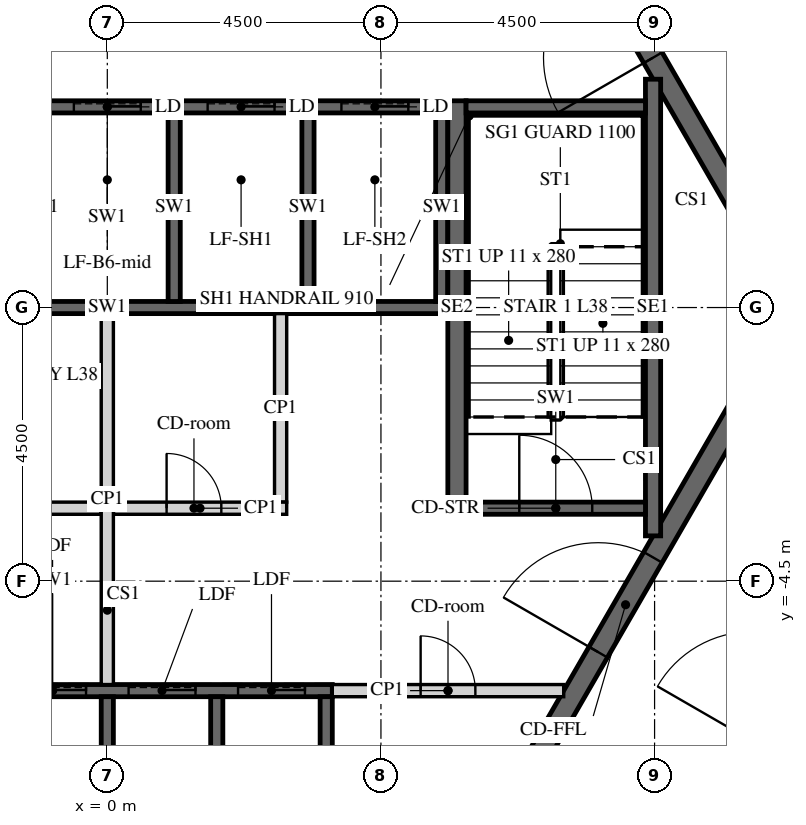
"""IFC4 building model, lengths in metres.
Left out: names, types, materials, properties, quantities, classifications, styles, units other than length and angle.
Written with IfcOpenShell. Run it as: python <this file> out.ifc"""

import sys

from ifc_helpers import new_model, si_unit, direction, frame, frame_2d, origin, place, context, subcontext, project, spatial, polyline, rectangle, outline, extrude, element, fill, save


model = new_model("IFC4")
c1 = context("Model", 3, precision=1e-05, world=origin(), true_north=direction((0.0, 1.0)))
c2 = subcontext(c1, "Body", "Model", "MODEL_VIEW")
j1 = project(units=[si_unit("LENGTHUNIT", "METRE"), si_unit("PLANEANGLEUNIT", "RADIAN")], contexts=[c1])
p1 = place(None, origin())
s1 = spatial("IfcSite", under=j1, at=p1, CompositionType="ELEMENT")
p2 = place(p1, origin())
s2 = spatial("IfcBuilding", under=s1, at=p2, CompositionType="ELEMENT")
p3 = place(p2, frame((0.0, 0.0, 164.4)))
s3 = spatial("IfcBuildingStorey", under=s2, at=p3, CompositionType="ELEMENT", Elevation=164.4)
p4 = place(p3, frame((7.361, -12.75, -0.15), z_axis=(0.0, 0.0, 1.0), x_axis=(0.50000571537, 0.866022103989, 0.0)))
e1 = element("IfcWall", 1, at=p4, inside=s3, PredefinedType="SHEAR", context=c2, shape_type="SweptSolid", body=[
    extrude(outline(polyline([(-0.144, -0.25), (14.867, -0.25), (14.578, 0.25), (0.144, 0.25), (-0.144, -0.25)])), origin(), (0.0, 0.0, 1.0), 3.9),
])
p5 = place(p4, frame((6.49, 0.0, 0.15)))
e2 = element("IfcOpeningElement", 2, at=p5, cuts=e1, PredefinedType="OPENING", context=c2, shape_type="SweptSolid", body=[
    extrude(rectangle(XDim=1.8, YDim=2.4, at=frame_2d((0.9, 1.2))), frame((0.0, 0.26, 0.0), z_axis=(0.0, -1.0, 0.0), x_axis=(1.0, 0.0, 0.0)), (0.0, 0.0, 1.0), 0.52),
])
p6 = place(p3, frame((14.722, 0.0, -0.15), z_axis=(0.0, 0.0, 1.0), x_axis=(-0.50000571537, 0.866022103989, 0.0)))
e3 = element("IfcWall", 3, at=p6, inside=s3, PredefinedType="SHEAR", context=c2, shape_type="SweptSolid", body=[
    extrude(outline(polyline([(-0.144, -0.25), (14.867, -0.25), (14.578, 0.25), (0.144, 0.25), (-0.144, -0.25)])), origin(), (0.0, 0.0, 1.0), 3.9),
])
p7 = place(p6, frame((6.432, 0.0, 0.15)))
e4 = element("IfcOpeningElement", 4, at=p7, cuts=e3, PredefinedType="OPENING", context=c2, shape_type="SweptSolid", body=[
    extrude(rectangle(XDim=1.8, YDim=2.4, at=frame_2d((0.9, 1.2))), frame((0.0, 0.26, 0.0), z_axis=(0.0, -1.0, 0.0), x_axis=(1.0, 0.0, 0.0)), (0.0, 0.0, 1.0), 0.52),
])
p8 = place(p3, frame((5.673, -9.825, -0.15), z_axis=(0.0, 0.0, 1.0), x_axis=(0.499995046907, 0.866028263435, 0.0)))
e5 = element("IfcWall", 5, at=p8, inside=s3, PredefinedType="SHEAR", context=c2, shape_type="SweptSolid", body=[
    extrude(outline(polyline([(-0.101, -0.175), (11.446, -0.175), (11.244, 0.175), (0.101, 0.175), (-0.101, -0.175)])), origin(), (0.0, 0.0, 1.0), 3.9),
])
p9 = place(p8, frame((4.801, 0.0, 0.15)))
e6 = element("IfcOpeningElement", 6, at=p9, cuts=e5, PredefinedType="OPENING", context=c2, shape_type="SweptSolid", body=[
    extrude(rectangle(XDim=1.8, YDim=2.4, at=frame_2d((0.9, 1.2))), frame((0.0, 0.185, 0.0), z_axis=(0.0, -1.0, 0.0), x_axis=(1.0, 0.0, 0.0)), (0.0, 0.0, 1.0), 0.37),
])
p10 = place(p3, frame((11.345, 0.0, -0.15), z_axis=(0.0, 0.0, 1.0), x_axis=(-0.499995046907, 0.866028263435, 0.0)))
e7 = element("IfcWall", 7, at=p10, inside=s3, PredefinedType="SHEAR", context=c2, shape_type="SweptSolid", body=[
    extrude(outline(polyline([(-0.101, -0.175), (11.446, -0.175), (11.244, 0.175), (0.101, 0.175), (-0.101, -0.175)])), origin(), (0.0, 0.0, 1.0), 3.9),
])
p11 = place(p10, frame((4.744, 0.0, 0.15)))
e8 = element("IfcOpeningElement", 8, at=p11, cuts=e7, PredefinedType="OPENING", context=c2, shape_type="SweptSolid", body=[
    extrude(rectangle(XDim=1.8, YDim=2.4, at=frame_2d((0.9, 1.2))), frame((0.0, 0.185, 0.0), z_axis=(0.0, -1.0, 0.0), x_axis=(1.0, 0.0, 0.0)), (0.0, 0.0, 1.0), 0.37),
])
p12 = place(p3, frame((-5.6, 3.3, -0.25), z_axis=(0.0, 0.0, 1.0), x_axis=(1.0, 0.0, 0.0)))
e9 = element("IfcWall", 9, at=p12, inside=s3, PredefinedType="SHEAR", context=c2, shape_type="SweptSolid", body=[
    extrude(rectangle(XDim=11.2, YDim=0.2, at=frame_2d((5.6, 0.0))), origin(), (0.0, 0.0, 1.0), 3.9),
])
p13 = place(p12, frame((0.65, 0.0, 0.25)))
e10 = element("IfcOpeningElement", 10, at=p13, cuts=e9, PredefinedType="OPENING", context=c2, shape_type="SweptSolid", body=[
    extrude(rectangle(XDim=1.1, YDim=2.1, at=frame_2d((0.55, 1.05))), frame((0.0, 0.11, 0.0), z_axis=(0.0, -1.0, 0.0), x_axis=(1.0, 0.0, 0.0)), (0.0, 0.0, 1.0), 0.22),
])
p14 = place(p12, frame((2.85, 0.0, 0.25)))
e11 = element("IfcOpeningElement", 11, at=p14, cuts=e9, PredefinedType="OPENING", context=c2, shape_type="SweptSolid", body=[
    extrude(rectangle(XDim=1.1, YDim=2.1, at=frame_2d((0.55, 1.05))), frame((0.0, 0.11, 0.0), z_axis=(0.0, -1.0, 0.0), x_axis=(1.0, 0.0, 0.0)), (0.0, 0.0, 1.0), 0.22),
])
p15 = place(p12, frame((5.05, 0.0, 0.25)))
e12 = element("IfcOpeningElement", 12, at=p15, cuts=e9, PredefinedType="OPENING", context=c2, shape_type="SweptSolid", body=[
    extrude(rectangle(XDim=1.1, YDim=2.1, at=frame_2d((0.55, 1.05))), frame((0.0, 0.11, 0.0), z_axis=(0.0, -1.0, 0.0), x_axis=(1.0, 0.0, 0.0)), (0.0, 0.0, 1.0), 0.22),
])
p16 = place(p12, frame((7.25, 0.0, 0.25)))
e13 = element("IfcOpeningElement", 13, at=p16, cuts=e9, PredefinedType="OPENING", context=c2, shape_type="SweptSolid", body=[
    extrude(rectangle(XDim=1.1, YDim=2.1, at=frame_2d((0.55, 1.05))), frame((0.0, 0.11, 0.0), z_axis=(0.0, -1.0, 0.0), x_axis=(1.0, 0.0, 0.0)), (0.0, 0.0, 1.0), 0.22),
])
p17 = place(p12, frame((9.45, 0.0, 0.25)))
e14 = element("IfcOpeningElement", 14, at=p17, cuts=e9, PredefinedType="OPENING", context=c2, shape_type="SweptSolid", body=[
    extrude(rectangle(XDim=1.1, YDim=2.1, at=frame_2d((0.55, 1.05))), frame((0.0, 0.11, 0.0), z_axis=(0.0, -1.0, 0.0), x_axis=(1.0, 0.0, 0.0)), (0.0, 0.0, 1.0), 0.22),
])
p18 = place(p3, frame((-5.6, 0.0, -0.25), z_axis=(0.0, 0.0, 1.0), x_axis=(1.0, 0.0, 0.0)))
e15 = element("IfcWall", 15, at=p18, inside=s3, PredefinedType="SHEAR", context=c2, shape_type="SweptSolid", body=[
    extrude(rectangle(XDim=11.2, YDim=0.2, at=frame_2d((5.6, 0.0))), origin(), (0.0, 0.0, 1.0), 3.9),
])
for number, where, z_axis, x_axis in (
    (16, (1.1, 0.1, -0.25), (0.0, 0.0, 1.0), (0.0, 1.0, 0.0)),
    (17, (3.3, 0.1, -0.25), (0.0, 0.0, 1.0), (0.0, 1.0, 0.0)),
    (18, (5.5, 0.1, -0.25), (0.0, 0.0, 1.0), (0.0, 1.0, 0.0)),
):
    element("IfcWall", number, at=place(p3, frame(where, z_axis=z_axis, x_axis=x_axis)), inside=s3, PredefinedType="SHEAR", context=c2, shape_type="SweptSolid", body=[
        extrude(rectangle(XDim=3.1, YDim=0.2, at=frame_2d((1.55, 0.0))), origin(), (0.0, 0.0, 1.0), 3.9),
    ])
p19 = place(p3, frame((-5.5, -6.3, -0.25), z_axis=(0.0, 0.0, 1.0), x_axis=(1.0, 0.0, 0.0)))
e19 = element("IfcWall", 19, at=p19, inside=s3, PredefinedType="SHEAR", context=c2, shape_type="SweptSolid", body=[
    extrude(rectangle(XDim=9.2, YDim=0.2, at=frame_2d((4.6, 0.0))), origin(), (0.0, 0.0, 1.0), 3.9),
])
p20 = place(p19, frame((0.45, 0.0, 0.25)))
e20 = element("IfcOpeningElement", 20, at=p20, cuts=e19, PredefinedType="OPENING", context=c2, shape_type="SweptSolid", body=[
    extrude(rectangle(XDim=1.1, YDim=2.1, at=frame_2d((0.55, 1.05))), frame((0.0, 0.11, 0.0), z_axis=(0.0, -1.0, 0.0), x_axis=(1.0, 0.0, 0.0)), (0.0, 0.0, 1.0), 0.22),
])
p21 = place(p19, frame((2.25, 0.0, 0.25)))
e21 = element("IfcOpeningElement", 21, at=p21, cuts=e19, PredefinedType="OPENING", context=c2, shape_type="SweptSolid", body=[
    extrude(rectangle(XDim=1.1, YDim=2.1, at=frame_2d((0.55, 1.05))), frame((0.0, 0.11, 0.0), z_axis=(0.0, -1.0, 0.0), x_axis=(1.0, 0.0, 0.0)), (0.0, 0.0, 1.0), 0.22),
])
p22 = place(p19, frame((4.05, 0.0, 0.25)))
e22 = element("IfcOpeningElement", 22, at=p22, cuts=e19, PredefinedType="OPENING", context=c2, shape_type="SweptSolid", body=[
    extrude(rectangle(XDim=1.1, YDim=2.1, at=frame_2d((0.55, 1.05))), frame((0.0, 0.11, 0.0), z_axis=(0.0, -1.0, 0.0), x_axis=(1.0, 0.0, 0.0)), (0.0, 0.0, 1.0), 0.22),
])
p23 = place(p19, frame((5.85, 0.0, 0.25)))
e23 = element("IfcOpeningElement", 23, at=p23, cuts=e19, PredefinedType="OPENING", context=c2, shape_type="SweptSolid", body=[
    extrude(rectangle(XDim=1.1, YDim=2.1, at=frame_2d((0.55, 1.05))), frame((0.0, 0.11, 0.0), z_axis=(0.0, -1.0, 0.0), x_axis=(1.0, 0.0, 0.0)), (0.0, 0.0, 1.0), 0.22),
])
p24 = place(p19, frame((7.65, 0.0, 0.25)))
e24 = element("IfcOpeningElement", 24, at=p24, cuts=e19, PredefinedType="OPENING", context=c2, shape_type="SweptSolid", body=[
    extrude(rectangle(XDim=1.1, YDim=2.1, at=frame_2d((0.55, 1.05))), frame((0.0, 0.11, 0.0), z_axis=(0.0, -1.0, 0.0), x_axis=(1.0, 0.0, 0.0)), (0.0, 0.0, 1.0), 0.22),
])
for number, where, z_axis, x_axis in (
    (25, (0.0, -9.3, -0.25), (0.0, 0.0, 1.0), (0.0, 1.0, 0.0)),
    (26, (1.8, -9.3, -0.25), (0.0, 0.0, 1.0), (0.0, 1.0, 0.0)),
    (27, (3.6, -9.3, -0.25), (0.0, 0.0, 1.0), (0.0, 1.0, 0.0)),
):
    element("IfcWall", number, at=place(p3, frame(where, z_axis=z_axis, x_axis=x_axis)), inside=s3, PredefinedType="SHEAR", context=c2, shape_type="SweptSolid", body=[
        extrude(rectangle(XDim=2.9, YDim=0.2, at=frame_2d((1.45, 0.0))), origin(), (0.0, 0.0, 1.0), 3.9),
    ])
p25 = place(p3, frame((-5.6, -3.3, 0.0), z_axis=(0.0, 0.0, 1.0), x_axis=(1.0, 0.0, 0.0)))
e28 = element("IfcWall", 28, at=p25, inside=s3, PredefinedType="PARTITIONING", context=c2, shape_type="SweptSolid", body=[
    extrude(rectangle(XDim=5.5, YDim=0.2, at=frame_2d((2.75, 0.0))), origin(), (0.0, 0.0, 1.0), 3.65),
])
p26 = place(p25, frame((2.3, 0.0, 0.0)))
e29 = element("IfcOpeningElement", 29, at=p26, cuts=e28, PredefinedType="OPENING", context=c2, shape_type="SweptSolid", body=[
    extrude(rectangle(XDim=0.9, YDim=2.1, at=frame_2d((0.45, 1.05))), frame((0.0, 0.11, 0.0), z_axis=(0.0, -1.0, 0.0), x_axis=(1.0, 0.0, 0.0)), (0.0, 0.0, 1.0), 0.22),
])
p27 = place(p3, frame((0.1, -3.3, 0.0), z_axis=(0.0, 0.0, 1.0), x_axis=(1.0, 0.0, 0.0)))
e30 = element("IfcWall", 30, at=p27, inside=s3, PredefinedType="PARTITIONING", context=c2, shape_type="SweptSolid", body=[
    extrude(rectangle(XDim=2.85, YDim=0.2, at=frame_2d((1.425, 0.0))), origin(), (0.0, 0.0, 1.0), 3.65),
])
p28 = place(p27, frame((0.875, 0.0, 0.0)))
e31 = element("IfcOpeningElement", 31, at=p28, cuts=e30, PredefinedType="OPENING", context=c2, shape_type="SweptSolid", body=[
    extrude(rectangle(XDim=0.9, YDim=2.1, at=frame_2d((0.45, 1.05))), frame((0.0, 0.11, 0.0), z_axis=(0.0, -1.0, 0.0), x_axis=(1.0, 0.0, 0.0)), (0.0, 0.0, 1.0), 0.22),
])
p29 = place(p3, frame((2.85, -3.2, 0.0), z_axis=(0.0, 0.0, 1.0), x_axis=(0.0, 1.0, 0.0)))
e32 = element("IfcWall", 32, at=p29, inside=s3, PredefinedType="PARTITIONING", context=c2, shape_type="SweptSolid", body=[
    extrude(rectangle(XDim=3.1, YDim=0.2, at=frame_2d((1.55, 0.0))), origin(), (0.0, 0.0, 1.0), 3.65),
])
p30 = place(p3, frame((0.0, -6.2, 0.0), z_axis=(0.0, 0.0, 1.0), x_axis=(0.0, 1.0, 0.0)))
e33 = element("IfcWall", 33, at=p30, inside=s3, PredefinedType="PARTITIONING", context=c2, shape_type="SweptSolid", body=[
    extrude(rectangle(XDim=6.1, YDim=0.2, at=frame_2d((3.05, 0.0))), origin(), (0.0, 0.0, 1.0), 3.65),
])
p31 = place(p3, frame((3.7, -6.3, 0.0), z_axis=(0.0, 0.0, 1.0), x_axis=(1.0, 0.0, 0.0)))
e34 = element("IfcWall", 34, at=p31, inside=s3, PredefinedType="PARTITIONING", context=c2, shape_type="SweptSolid", body=[
    extrude(rectangle(XDim=3.806, YDim=0.2, at=frame_2d((1.903, 0.0))), origin(), (0.0, 0.0, 1.0), 3.65),
])
p32 = place(p31, frame((1.453, 0.0, 0.0)))
e35 = element("IfcOpeningElement", 35, at=p32, cuts=e34, PredefinedType="OPENING", context=c2, shape_type="SweptSolid", body=[
    extrude(rectangle(XDim=0.9, YDim=2.1, at=frame_2d((0.45, 1.05))), frame((0.0, 0.11, 0.0), z_axis=(0.0, -1.0, 0.0), x_axis=(1.0, 0.0, 0.0)), (0.0, 0.0, 1.0), 0.22),
])
p33 = place(p3, frame((5.75, -3.4, -0.25), z_axis=(0.0, 0.0, 1.0), x_axis=(0.0, 1.0, 0.0)))
e36 = element("IfcWall", 36, at=p33, inside=s3, PredefinedType="SHEAR", context=c2, shape_type="SweptSolid", body=[
    extrude(rectangle(XDim=6.8, YDim=0.3, at=frame_2d((3.4, 0.0))), origin(), (0.0, 0.0, 1.0), 3.9),
])
p34 = place(p3, frame((8.975, -3.755, -0.25), z_axis=(0.0, 0.0, 1.0), x_axis=(0.0, 1.0, 0.0)))
e37 = element("IfcWall", 37, at=p34, inside=s3, PredefinedType="SHEAR", context=c2, shape_type="SweptSolid", body=[
    extrude(rectangle(XDim=7.51, YDim=0.25, at=frame_2d((3.755, 0.0))), origin(), (0.0, 0.0, 1.0), 3.9),
])
p35 = place(p3, frame((5.9, 3.3, -0.25), z_axis=(0.0, 0.0, 1.0), x_axis=(1.0, 0.0, 0.0)))
e38 = element("IfcWall", 38, at=p35, inside=s3, PredefinedType="SHEAR", context=c2, shape_type="SweptSolid", body=[
    extrude(rectangle(XDim=2.95, YDim=0.2, at=frame_2d((1.475, 0.0))), origin(), (0.0, 0.0, 1.0), 3.9),
])
p36 = place(p3, frame((5.9, -3.3, -0.25), z_axis=(0.0, 0.0, 1.0), x_axis=(1.0, 0.0, 0.0)))
e39 = element("IfcWall", 39, at=p36, inside=s3, PredefinedType="SHEAR", context=c2, shape_type="SweptSolid", body=[
    extrude(rectangle(XDim=2.95, YDim=0.2, at=frame_2d((1.475, 0.0))), origin(), (0.0, 0.0, 1.0), 3.9),
])
p37 = place(p36, frame((0.875, 0.0, 0.25)))
e40 = element("IfcOpeningElement", 40, at=p37, cuts=e39, PredefinedType="OPENING", context=c2, shape_type="SweptSolid", body=[
    extrude(rectangle(XDim=1.2, YDim=2.4, at=frame_2d((0.6, 1.2))), frame((0.0, 0.11, 0.0), z_axis=(0.0, -1.0, 0.0), x_axis=(1.0, 0.0, 0.0)), (0.0, 0.0, 1.0), 0.22),
])
p38 = place(p3, frame((17.277, 0.075, 0.0), z_axis=(0.0, 0.0, 1.0), x_axis=(-0.499988884089, 0.866031821464, 0.0)))
e41 = element("IfcWall", 41, at=p38, inside=s3, PredefinedType="PARTITIONING", context=c2, shape_type="SweptSolid", body=[
    extrude(rectangle(XDim=14.78, YDim=0.15, at=frame_2d((7.39, 0.0))), origin(), (0.0, 0.0, 1.0), 2.988),
])
p39 = place(p38, frame((4.393, 0.0, 0.0)))
e42 = element("IfcOpeningElement", 42, at=p39, cuts=e41, PredefinedType="OPENING", context=c2, shape_type="SweptSolid", body=[
    extrude(rectangle(XDim=1.0, YDim=2.1, at=frame_2d((0.5, 1.05))), frame((0.0, 0.085, 0.0), z_axis=(0.0, -1.0, 0.0), x_axis=(1.0, 0.0, 0.0)), (0.0, 0.0, 1.0), 0.17),
])
p40 = place(p38, frame((8.885, 0.0, 0.0)))
e43 = element("IfcOpeningElement", 43, at=p40, cuts=e41, PredefinedType="OPENING", context=c2, shape_type="SweptSolid", body=[
    extrude(rectangle(XDim=1.0, YDim=2.1, at=frame_2d((0.5, 1.05))), frame((0.0, 0.085, 0.0), z_axis=(0.0, -1.0, 0.0), x_axis=(1.0, 0.0, 0.0)), (0.0, 0.0, 1.0), 0.17),
])
p41 = place(p11, origin())
e44 = element("IfcDoor", 44, at=p41, inside=s3, OperationType="DOUBLE_DOOR_SINGLE_SWING", PredefinedType="DOOR", context=c2, shape_type="SweptSolid", body=[
    extrude(rectangle(XDim=1.8, YDim=2.4, at=frame_2d((0.9, 1.2))), frame((0.0, 0.025, 0.0), z_axis=(0.0, -1.0, 0.0), x_axis=(1.0, 0.0, 0.0)), (0.0, 0.0, 1.0), 0.05),
])
fill(e8, e44)
p42 = place(p9, origin())
e45 = element("IfcDoor", 45, at=p42, inside=s3, OperationType="DOUBLE_DOOR_SINGLE_SWING", PredefinedType="DOOR", context=c2, shape_type="SweptSolid", body=[
    extrude(rectangle(XDim=1.8, YDim=2.4, at=frame_2d((0.9, 1.2))), frame((0.0, 0.025, 0.0), z_axis=(0.0, -1.0, 0.0), x_axis=(1.0, 0.0, 0.0)), (0.0, 0.0, 1.0), 0.05),
])
fill(e6, e45)
p43 = place(p28, origin())
e46 = element("IfcDoor", 46, at=p43, inside=s3, OperationType="SINGLE_SWING_LEFT", PredefinedType="DOOR", context=c2, shape_type="SweptSolid", body=[
    extrude(rectangle(XDim=0.9, YDim=2.1, at=frame_2d((0.45, 1.05))), frame((0.0, 0.025, 0.0), z_axis=(0.0, -1.0, 0.0), x_axis=(1.0, 0.0, 0.0)), (0.0, 0.0, 1.0), 0.05),
])
fill(e31, e46)
p44 = place(p32, origin())
e47 = element("IfcDoor", 47, at=p44, inside=s3, OperationType="SINGLE_SWING_LEFT", PredefinedType="DOOR", context=c2, shape_type="SweptSolid", body=[
    extrude(rectangle(XDim=0.9, YDim=2.1, at=frame_2d((0.45, 1.05))), frame((0.0, 0.025, 0.0), z_axis=(0.0, -1.0, 0.0), x_axis=(1.0, 0.0, 0.0)), (0.0, 0.0, 1.0), 0.05),
])
fill(e35, e47)
p45 = place(p37, origin())
e48 = element("IfcDoor", 48, at=p45, inside=s3, OperationType="SINGLE_SWING_LEFT", PredefinedType="DOOR", context=c2, shape_type="SweptSolid", body=[
    extrude(rectangle(XDim=1.2, YDim=2.4, at=frame_2d((0.6, 1.2))), frame((0.0, 0.025, 0.0), z_axis=(0.0, -1.0, 0.0), x_axis=(1.0, 0.0, 0.0)), (0.0, 0.0, 1.0), 0.05),
])
fill(e40, e48)
p46 = place(p15, origin())
e49 = element("IfcDoor", 49, at=p46, inside=s3, OperationType="SLIDING_TO_LEFT", PredefinedType="DOOR", context=c2, shape_type="SweptSolid", body=[
    extrude(rectangle(XDim=1.1, YDim=2.1, at=frame_2d((0.55, 1.05))), frame((0.0, 0.025, 0.0), z_axis=(0.0, -1.0, 0.0), x_axis=(1.0, 0.0, 0.0)), (0.0, 0.0, 1.0), 0.05),
])
fill(e12, e49)
p47 = place(p16, origin())
e50 = element("IfcDoor", 50, at=p47, inside=s3, OperationType="SLIDING_TO_LEFT", PredefinedType="DOOR", context=c2, shape_type="SweptSolid", body=[
    extrude(rectangle(XDim=1.1, YDim=2.1, at=frame_2d((0.55, 1.05))), frame((0.0, 0.025, 0.0), z_axis=(0.0, -1.0, 0.0), x_axis=(1.0, 0.0, 0.0)), (0.0, 0.0, 1.0), 0.05),
])
fill(e13, e50)
p48 = place(p17, origin())
e51 = element("IfcDoor", 51, at=p48, inside=s3, OperationType="SLIDING_TO_LEFT", PredefinedType="DOOR", context=c2, shape_type="SweptSolid", body=[
    extrude(rectangle(XDim=1.1, YDim=2.1, at=frame_2d((0.55, 1.05))), frame((0.0, 0.025, 0.0), z_axis=(0.0, -1.0, 0.0), x_axis=(1.0, 0.0, 0.0)), (0.0, 0.0, 1.0), 0.05),
])
fill(e14, e51)
p49 = place(p22, origin())
e52 = element("IfcDoor", 52, at=p49, inside=s3, OperationType="SLIDING_TO_LEFT", PredefinedType="DOOR", context=c2, shape_type="SweptSolid", body=[
    extrude(rectangle(XDim=1.1, YDim=2.1, at=frame_2d((0.55, 1.05))), frame((0.0, 0.025, 0.0), z_axis=(0.0, -1.0, 0.0), x_axis=(1.0, 0.0, 0.0)), (0.0, 0.0, 1.0), 0.05),
])
fill(e22, e52)
p50 = place(p23, origin())
e53 = element("IfcDoor", 53, at=p50, inside=s3, OperationType="SLIDING_TO_LEFT", PredefinedType="DOOR", context=c2, shape_type="SweptSolid", body=[
    extrude(rectangle(XDim=1.1, YDim=2.1, at=frame_2d((0.55, 1.05))), frame((0.0, 0.025, 0.0), z_axis=(0.0, -1.0, 0.0), x_axis=(1.0, 0.0, 0.0)), (0.0, 0.0, 1.0), 0.05),
])
fill(e23, e53)
p51 = place(p24, origin())
e54 = element("IfcDoor", 54, at=p51, inside=s3, OperationType="SLIDING_TO_LEFT", PredefinedType="DOOR", context=c2, shape_type="SweptSolid", body=[
    extrude(rectangle(XDim=1.1, YDim=2.1, at=frame_2d((0.55, 1.05))), frame((0.0, 0.025, 0.0), z_axis=(0.0, -1.0, 0.0), x_axis=(1.0, 0.0, 0.0)), (0.0, 0.0, 1.0), 0.05),
])
fill(e24, e54)
save(model, sys.argv[1])
